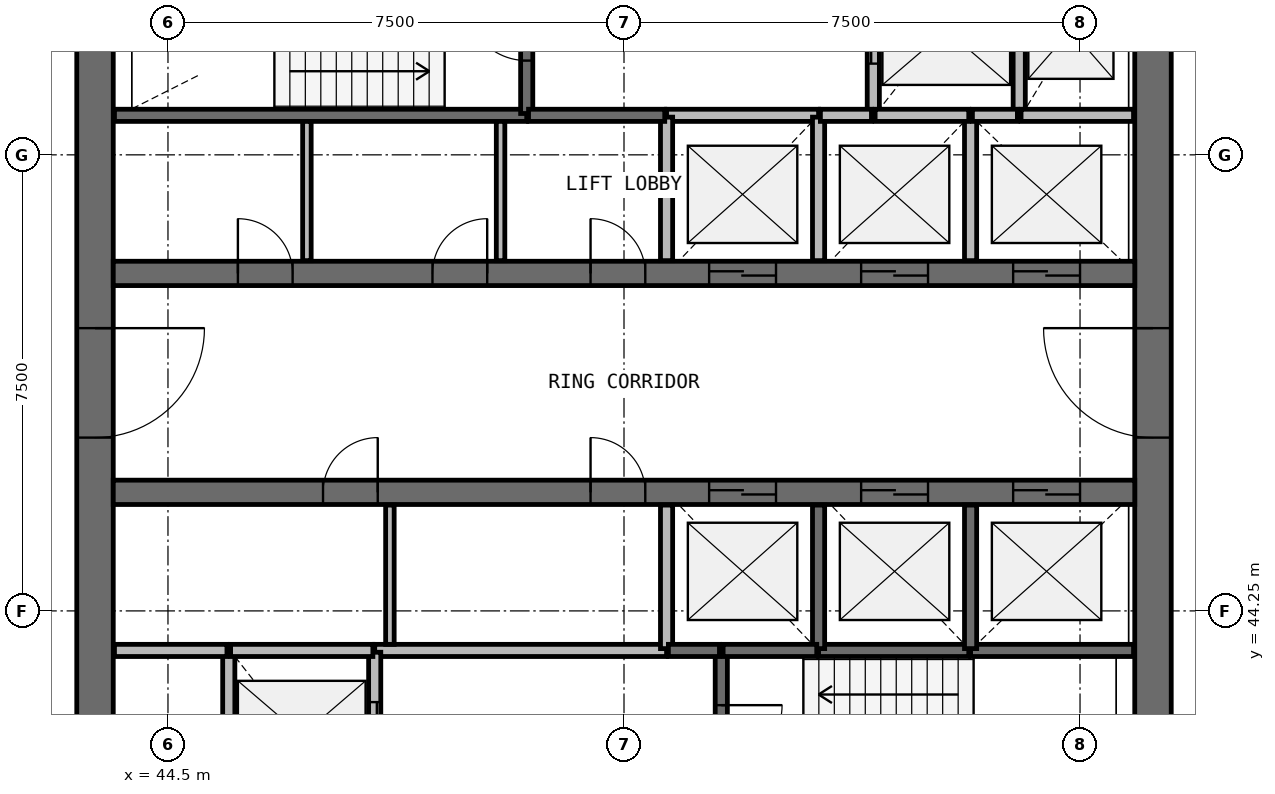
"""IFC4 building model, lengths in metres.
Left out: names, types, materials, properties, quantities, classifications, styles, units other than length and angle.
Written with IfcOpenShell. Run it as: python <this file> out.ifc"""

import sys

from ifc_helpers import new_model, si_unit, direction, frame, frame_2d, origin, place, context, subcontext, project, spatial, rectangle, extrude, source, transform, mapped, element, fill, save


model = new_model("IFC4")
c1 = context("Model", 3, precision=1e-05, world=origin(), true_north=direction((0.0, 1.0)))
c2 = subcontext(c1, "Body", "Model", "MODEL_VIEW")
j1 = project(units=[si_unit("LENGTHUNIT", "METRE"), si_unit("PLANEANGLEUNIT", "RADIAN")], contexts=[c1])
p1 = place(None, origin())
s1 = spatial("IfcSite", under=j1, at=p1, CompositionType="ELEMENT")
p2 = place(p1, origin())
s2 = spatial("IfcBuilding", under=s1, at=p2, CompositionType="ELEMENT")
p3 = place(p2, frame((0.0, 0.0, 195.5)))
s3 = spatial("IfcBuildingStorey", under=s2, at=p3, CompositionType="ELEMENT", Elevation=195.5)
p4 = place(p3, frame((60.7, 40.0, 0.0), z_axis=(0.0, 0.0, 1.0), x_axis=(0.0, 1.0, 0.0)))
e1 = element("IfcWall", 1, at=p4, inside=s3, PredefinedType="SHEAR", context=c2, shape_type="SweptSolid", body=[
    extrude(rectangle(XDim=16.0, YDim=0.6, at=frame_2d((8.0, 0.0))), origin(), (0.0, 0.0, 1.0), 3.9),
])
p5 = place(p4, frame((7.1, 0.0, 0.0)))
e2 = element("IfcOpeningElement", 2, at=p5, cuts=e1, PredefinedType="OPENING", context=c2, shape_type="SweptSolid", body=[
    extrude(rectangle(XDim=1.8, YDim=2.1, at=frame_2d((0.9, 1.05))), frame((0.0, 0.31, 0.0), z_axis=(0.0, -1.0, 0.0), x_axis=(1.0, 0.0, 0.0)), (0.0, 0.0, 1.0), 0.62),
])
p6 = place(p3, frame((43.3, 56.0, 0.0), z_axis=(0.0, 0.0, 1.0), x_axis=(0.0, -1.0, 0.0)))
e3 = element("IfcWall", 3, at=p6, inside=s3, PredefinedType="SHEAR", context=c2, shape_type="SweptSolid", body=[
    extrude(rectangle(XDim=16.0, YDim=0.6, at=frame_2d((8.0, 0.0))), origin(), (0.0, 0.0, 1.0), 3.9),
])
p7 = place(p6, frame((7.1, 0.0, 0.0)))
e4 = element("IfcOpeningElement", 4, at=p7, cuts=e3, PredefinedType="OPENING", context=c2, shape_type="SweptSolid", body=[
    extrude(rectangle(XDim=1.8, YDim=2.1, at=frame_2d((0.9, 1.05))), frame((0.0, 0.31, 0.0), z_axis=(0.0, -1.0, 0.0), x_axis=(1.0, 0.0, 0.0)), (0.0, 0.0, 1.0), 0.62),
])
p8 = place(p3, frame((43.6, 49.8, 0.0), z_axis=(0.0, 0.0, 1.0), x_axis=(1.0, 0.0, 0.0)))
e5 = element("IfcWall", 5, at=p8, inside=s3, PredefinedType="SHEAR", context=c2, shape_type="SweptSolid", body=[
    extrude(rectangle(XDim=16.8, YDim=0.4, at=frame_2d((8.4, 0.0))), origin(), (0.0, 0.0, 1.0), 3.9),
])
p9 = place(p8, frame((9.8, 0.0, 0.0)))
e6 = element("IfcOpeningElement", 6, at=p9, cuts=e5, PredefinedType="OPENING", context=c2, shape_type="SweptSolid", body=[
    extrude(rectangle(XDim=1.1, YDim=2.1, at=frame_2d((0.55, 1.05))), frame((0.0, 0.21, 0.0), z_axis=(0.0, -1.0, 0.0), x_axis=(1.0, 0.0, 0.0)), (0.0, 0.0, 1.0), 0.42),
])
p10 = place(p8, frame((12.3, 0.0, 0.0)))
e7 = element("IfcOpeningElement", 7, at=p10, cuts=e5, PredefinedType="OPENING", context=c2, shape_type="SweptSolid", body=[
    extrude(rectangle(XDim=1.1, YDim=2.1, at=frame_2d((0.55, 1.05))), frame((0.0, 0.21, 0.0), z_axis=(0.0, -1.0, 0.0), x_axis=(1.0, 0.0, 0.0)), (0.0, 0.0, 1.0), 0.42),
])
p11 = place(p8, frame((14.8, 0.0, 0.0)))
e8 = element("IfcOpeningElement", 8, at=p11, cuts=e5, PredefinedType="OPENING", context=c2, shape_type="SweptSolid", body=[
    extrude(rectangle(XDim=1.1, YDim=2.1, at=frame_2d((0.55, 1.05))), frame((0.0, 0.21, 0.0), z_axis=(0.0, -1.0, 0.0), x_axis=(1.0, 0.0, 0.0)), (0.0, 0.0, 1.0), 0.42),
])
p12 = place(p8, frame((2.05, 0.0, 0.0)))
e9 = element("IfcOpeningElement", 9, at=p12, cuts=e5, PredefinedType="OPENING", context=c2, shape_type="SweptSolid", body=[
    extrude(rectangle(XDim=0.9, YDim=2.1, at=frame_2d((0.45, 1.05))), frame((0.0, 0.21, 0.0), z_axis=(0.0, -1.0, 0.0), x_axis=(1.0, 0.0, 0.0)), (0.0, 0.0, 1.0), 0.42),
])
p13 = place(p8, frame((5.25, 0.0, 0.0)))
e10 = element("IfcOpeningElement", 10, at=p13, cuts=e5, PredefinedType="OPENING", context=c2, shape_type="SweptSolid", body=[
    extrude(rectangle(XDim=0.9, YDim=2.1, at=frame_2d((0.45, 1.05))), frame((0.0, 0.21, 0.0), z_axis=(0.0, -1.0, 0.0), x_axis=(1.0, 0.0, 0.0)), (0.0, 0.0, 1.0), 0.42),
])
p14 = place(p8, frame((7.85, 0.0, 0.0)))
e11 = element("IfcOpeningElement", 11, at=p14, cuts=e5, PredefinedType="OPENING", context=c2, shape_type="SweptSolid", body=[
    extrude(rectangle(XDim=0.9, YDim=2.1, at=frame_2d((0.45, 1.05))), frame((0.0, 0.21, 0.0), z_axis=(0.0, -1.0, 0.0), x_axis=(1.0, 0.0, 0.0)), (0.0, 0.0, 1.0), 0.42),
])
p15 = place(p3, frame((43.6, 46.2, 0.0), z_axis=(0.0, 0.0, 1.0), x_axis=(1.0, 0.0, 0.0)))
e12 = element("IfcWall", 12, at=p15, inside=s3, PredefinedType="SHEAR", context=c2, shape_type="SweptSolid", body=[
    extrude(rectangle(XDim=16.8, YDim=0.4, at=frame_2d((8.4, 0.0))), origin(), (0.0, 0.0, 1.0), 3.9),
])
p16 = place(p15, frame((9.8, 0.0, 0.0)))
e13 = element("IfcOpeningElement", 13, at=p16, cuts=e12, PredefinedType="OPENING", context=c2, shape_type="SweptSolid", body=[
    extrude(rectangle(XDim=1.1, YDim=2.1, at=frame_2d((0.55, 1.05))), frame((0.0, 0.21, 0.0), z_axis=(0.0, -1.0, 0.0), x_axis=(1.0, 0.0, 0.0)), (0.0, 0.0, 1.0), 0.42),
])
p17 = place(p15, frame((12.3, 0.0, 0.0)))
e14 = element("IfcOpeningElement", 14, at=p17, cuts=e12, PredefinedType="OPENING", context=c2, shape_type="SweptSolid", body=[
    extrude(rectangle(XDim=1.1, YDim=2.1, at=frame_2d((0.55, 1.05))), frame((0.0, 0.21, 0.0), z_axis=(0.0, -1.0, 0.0), x_axis=(1.0, 0.0, 0.0)), (0.0, 0.0, 1.0), 0.42),
])
p18 = place(p15, frame((14.8, 0.0, 0.0)))
e15 = element("IfcOpeningElement", 15, at=p18, cuts=e12, PredefinedType="OPENING", context=c2, shape_type="SweptSolid", body=[
    extrude(rectangle(XDim=1.1, YDim=2.1, at=frame_2d((0.55, 1.05))), frame((0.0, 0.21, 0.0), z_axis=(0.0, -1.0, 0.0), x_axis=(1.0, 0.0, 0.0)), (0.0, 0.0, 1.0), 0.42),
])
p19 = place(p15, frame((3.45, 0.0, 0.0)))
e16 = element("IfcOpeningElement", 16, at=p19, cuts=e12, PredefinedType="OPENING", context=c2, shape_type="SweptSolid", body=[
    extrude(rectangle(XDim=0.9, YDim=2.1, at=frame_2d((0.45, 1.05))), frame((0.0, 0.21, 0.0), z_axis=(0.0, -1.0, 0.0), x_axis=(1.0, 0.0, 0.0)), (0.0, 0.0, 1.0), 0.42),
])
p20 = place(p15, frame((7.85, 0.0, 0.0)))
e17 = element("IfcOpeningElement", 17, at=p20, cuts=e12, PredefinedType="OPENING", context=c2, shape_type="SweptSolid", body=[
    extrude(rectangle(XDim=0.9, YDim=2.1, at=frame_2d((0.45, 1.05))), frame((0.0, 0.21, 0.0), z_axis=(0.0, -1.0, 0.0), x_axis=(1.0, 0.0, 0.0)), (0.0, 0.0, 1.0), 0.42),
])
p21 = place(p3, frame((43.62, 52.4, 0.0), z_axis=(0.0, 0.0, 1.0), x_axis=(1.0, 0.0, 0.0)))
e18 = element("IfcWall", 18, at=p21, inside=s3, PredefinedType="SOLIDWALL", context=c2, shape_type="SweptSolid", body=[
    extrude(rectangle(XDim=6.78, YDim=0.2, at=frame_2d((3.39, 0.0))), origin(), (0.0, 0.0, 1.0), 3.58),
])
p22 = place(p3, frame((52.7, 43.6, 0.0), z_axis=(0.0, 0.0, 1.0), x_axis=(-1.0, 0.0, 0.0)))
e19 = element("IfcWall", 19, at=p22, inside=s3, PredefinedType="SOLIDWALL", context=c2, shape_type="SweptSolid", body=[
    extrude(rectangle(XDim=4.8, YDim=0.2, at=frame_2d((2.4, 0.0))), origin(), (0.0, 0.0, 1.0), 3.58),
])
p23 = place(p3, frame((45.5, 43.6, 0.0), z_axis=(0.0, 0.0, 1.0), x_axis=(0.0, -1.0, 0.0)))
e20 = element("IfcWall", 20, at=p23, inside=s3, PredefinedType="SOLIDWALL", context=c2, shape_type="SweptSolid", body=[
    extrude(rectangle(XDim=2.98, YDim=0.2, at=frame_2d((1.49, 0.0))), origin(), (0.0, 0.0, 1.0), 3.58),
])
p24 = place(p3, frame((47.9, 40.62, 0.0), z_axis=(0.0, 0.0, 1.0), x_axis=(0.0, 1.0, 0.0)))
e21 = element("IfcWall", 21, at=p24, inside=s3, PredefinedType="SOLIDWALL", context=c2, shape_type="SweptSolid", body=[
    extrude(rectangle(XDim=2.95, YDim=0.2, at=frame_2d((1.475, 0.0))), origin(), (0.0, 0.0, 1.0), 3.58),
])
p25 = place(p24, frame((1.03, 0.0, 0.0)))
e22 = element("IfcOpeningElement", 22, at=p25, cuts=e21, PredefinedType="OPENING", context=c2, shape_type="SweptSolid", body=[
    extrude(rectangle(XDim=1.1, YDim=2.1, at=frame_2d((0.55, 1.05))), frame((0.0, 0.11, 0.0), z_axis=(0.0, -1.0, 0.0), x_axis=(1.0, 0.0, 0.0)), (0.0, 0.0, 1.0), 0.22),
])
p26 = place(p3, frame((50.4, 52.43, 0.0), z_axis=(0.0, 0.0, 1.0), x_axis=(0.0, 1.0, 0.0)))
e23 = element("IfcWall", 23, at=p26, inside=s3, PredefinedType="SOLIDWALL", context=c2, shape_type="SweptSolid", body=[
    extrude(rectangle(XDim=2.95, YDim=0.2, at=frame_2d((1.475, 0.0))), origin(), (0.0, 0.0, 1.0), 3.58),
])
p27 = place(p26, frame((0.87, 0.0, 0.0)))
e24 = element("IfcOpeningElement", 24, at=p27, cuts=e23, PredefinedType="OPENING", context=c2, shape_type="SweptSolid", body=[
    extrude(rectangle(XDim=1.0, YDim=2.1, at=frame_2d((0.5, 1.05))), frame((0.0, 0.11, 0.0), z_axis=(0.0, -1.0, 0.0), x_axis=(1.0, 0.0, 0.0)), (0.0, 0.0, 1.0), 0.22),
])
p28 = place(p3, frame((53.6, 43.6, 0.0), z_axis=(0.0, 0.0, 1.0), x_axis=(0.0, -1.0, 0.0)))
e25 = element("IfcWall", 25, at=p28, inside=s3, PredefinedType="SOLIDWALL", context=c2, shape_type="SweptSolid", body=[
    extrude(rectangle(XDim=2.98, YDim=0.2, at=frame_2d((1.49, 0.0))), origin(), (0.0, 0.0, 1.0), 3.58),
])
p29 = place(p28, frame((0.9, 0.0, 0.0)))
e26 = element("IfcOpeningElement", 26, at=p29, cuts=e25, PredefinedType="OPENING", context=c2, shape_type="SweptSolid", body=[
    extrude(rectangle(XDim=1.0, YDim=2.1, at=frame_2d((0.5, 1.05))), frame((0.0, 0.11, 0.0), z_axis=(0.0, -1.0, 0.0), x_axis=(1.0, 0.0, 0.0)), (0.0, 0.0, 1.0), 0.22),
])
p30 = place(p3, frame((56.1, 55.38, 0.0), z_axis=(0.0, 0.0, 1.0), x_axis=(0.0, -1.0, 0.0)))
e27 = element("IfcWall", 27, at=p30, inside=s3, PredefinedType="SOLIDWALL", context=c2, shape_type="SweptSolid", body=[
    extrude(rectangle(XDim=2.98, YDim=0.2, at=frame_2d((1.49, 0.0))), origin(), (0.0, 0.0, 1.0), 3.58),
])
p31 = place(p30, frame((1.03, 0.0, 0.0)))
e28 = element("IfcOpeningElement", 28, at=p31, cuts=e27, PredefinedType="OPENING", context=c2, shape_type="SweptSolid", body=[
    extrude(rectangle(XDim=1.1, YDim=2.1, at=frame_2d((0.55, 1.05))), frame((0.0, 0.11, 0.0), z_axis=(0.0, -1.0, 0.0), x_axis=(1.0, 0.0, 0.0)), (0.0, 0.0, 1.0), 0.22),
])
p32 = place(p3, frame((58.5, 52.4, 0.0), z_axis=(0.0, 0.0, 1.0), x_axis=(0.0, 1.0, 0.0)))
e29 = element("IfcWall", 29, at=p32, inside=s3, PredefinedType="SOLIDWALL", context=c2, shape_type="SweptSolid", body=[
    extrude(rectangle(XDim=2.98, YDim=0.2, at=frame_2d((1.49, 0.0))), origin(), (0.0, 0.0, 1.0), 3.58),
])
p33 = place(p3, frame((57.7, 43.6, 0.0), z_axis=(0.0, 0.0, 1.0), x_axis=(1.0, 0.0, 0.0)))
e30 = element("IfcWall", 30, at=p33, inside=s3, PredefinedType="SOLIDWALL", context=c2, shape_type="SweptSolid", body=[
    extrude(rectangle(XDim=2.68, YDim=0.2, at=frame_2d((1.34, 0.0))), origin(), (0.0, 0.0, 1.0), 3.58),
])
p34 = place(p3, frame((55.2, 52.4, 0.0), z_axis=(0.0, 0.0, 1.0), x_axis=(-1.0, 0.0, 0.0)))
e31 = element("IfcWall", 31, at=p34, inside=s3, PredefinedType="SOLIDWALL", context=c2, shape_type="SweptSolid", body=[
    extrude(rectangle(XDim=2.5, YDim=0.2, at=frame_2d((1.25, 0.0))), origin(), (0.0, 0.0, 1.0), 3.58),
])
p35 = place(p3, frame((55.2, 43.6, 0.0), z_axis=(0.0, 0.0, 1.0), x_axis=(1.0, 0.0, 0.0)))
e32 = element("IfcWall", 32, at=p35, inside=s3, PredefinedType="SOLIDWALL", context=c2, shape_type="SweptSolid", body=[
    extrude(rectangle(XDim=2.47, YDim=0.2, at=frame_2d((1.235, 0.0))), origin(), (0.0, 0.0, 1.0), 3.58),
])
p36 = place(p3, frame((47.87, 43.6, 0.0), z_axis=(0.0, 0.0, 1.0), x_axis=(-1.0, 0.0, 0.0)))
e33 = element("IfcWall", 33, at=p36, inside=s3, PredefinedType="SOLIDWALL", context=c2, shape_type="SweptSolid", body=[
    extrude(rectangle(XDim=2.34, YDim=0.2, at=frame_2d((1.17, 0.0))), origin(), (0.0, 0.0, 1.0), 3.58),
])
for number, where, z_axis, x_axis in (
    (34, (52.7, 45.99, 0.0), (0.0, 0.0, 1.0), (0.0, -1.0, 0.0)),
    (35, (52.7, 52.37, 0.0), (0.0, 0.0, 1.0), (0.0, -1.0, 0.0)),
    (36, (55.2, 43.63, 0.0), (0.0, 0.0, 1.0), (0.0, 1.0, 0.0)),
    (37, (55.2, 50.01, 0.0), (0.0, 0.0, 1.0), (0.0, 1.0, 0.0)),
    (38, (57.7, 43.63, 0.0), (0.0, 0.0, 1.0), (0.0, 1.0, 0.0)),
):
    element("IfcWall", number, at=place(p3, frame(where, z_axis=z_axis, x_axis=x_axis)), inside=s3, PredefinedType="SOLIDWALL", context=c2, shape_type="SweptSolid", body=[
        extrude(rectangle(XDim=2.36, YDim=0.2, at=frame_2d((1.18, 0.0))), origin(), (0.0, 0.0, 1.0), 3.58),
    ])
p37 = place(p3, frame((57.7, 50.01, 0.0), z_axis=(0.0, 0.0, 1.0), x_axis=(0.0, 1.0, 0.0)))
e39 = element("IfcWall", 39, at=p37, inside=s3, PredefinedType="SOLIDWALL", context=c2, shape_type="SweptSolid", body=[
    extrude(rectangle(XDim=2.39, YDim=0.2, at=frame_2d((1.195, 0.0))), origin(), (0.0, 0.0, 1.0), 3.58),
])
p38 = place(p3, frame((50.43, 52.4, 0.0), z_axis=(0.0, 0.0, 1.0), x_axis=(1.0, 0.0, 0.0)))
e40 = element("IfcWall", 40, at=p38, inside=s3, PredefinedType="SOLIDWALL", context=c2, shape_type="SweptSolid", body=[
    extrude(rectangle(XDim=2.24, YDim=0.2, at=frame_2d((1.12, 0.0))), origin(), (0.0, 0.0, 1.0), 3.58),
])
for number, where, z_axis, x_axis in (
    (41, (45.47, 43.6, 0.0), (0.0, 0.0, 1.0), (-1.0, 0.0, 0.0)),
    (42, (60.38, 52.4, 0.0), (0.0, 0.0, 1.0), (-1.0, 0.0, 0.0)),
):
    element("IfcWall", number, at=place(p3, frame(where, z_axis=z_axis, x_axis=x_axis)), inside=s3, PredefinedType="SOLIDWALL", context=c2, shape_type="SweptSolid", body=[
        extrude(rectangle(XDim=1.85, YDim=0.2, at=frame_2d((0.925, 0.0))), origin(), (0.0, 0.0, 1.0), 3.58),
    ])
for number, where, z_axis, x_axis in (
    (43, (53.63, 43.6, 0.0), (0.0, 0.0, 1.0), (1.0, 0.0, 0.0)),
    (44, (57.67, 52.4, 0.0), (0.0, 0.0, 1.0), (-1.0, 0.0, 0.0)),
):
    element("IfcWall", number, at=place(p3, frame(where, z_axis=z_axis, x_axis=x_axis)), inside=s3, PredefinedType="SOLIDWALL", context=c2, shape_type="SweptSolid", body=[
        extrude(rectangle(XDim=1.54, YDim=0.2, at=frame_2d((0.77, 0.0))), origin(), (0.0, 0.0, 1.0), 3.58),
    ])
for number, where, z_axis, x_axis in (
    (45, (52.73, 43.6, 0.0), (0.0, 0.0, 1.0), (1.0, 0.0, 0.0)),
    (46, (56.07, 52.4, 0.0), (0.0, 0.0, 1.0), (-1.0, 0.0, 0.0)),
):
    element("IfcWall", number, at=place(p3, frame(where, z_axis=z_axis, x_axis=x_axis)), inside=s3, PredefinedType="SOLIDWALL", context=c2, shape_type="SweptSolid", body=[
        extrude(rectangle(XDim=0.84, YDim=0.2, at=frame_2d((0.42, 0.0))), origin(), (0.0, 0.0, 1.0), 3.58),
    ])
p39 = place(p3, frame((58.47, 52.4, 0.0), z_axis=(0.0, 0.0, 1.0), x_axis=(-1.0, 0.0, 0.0)))
e47 = element("IfcWall", 47, at=p39, inside=s3, PredefinedType="SOLIDWALL", context=c2, shape_type="SweptSolid", body=[
    extrude(rectangle(XDim=0.74, YDim=0.2, at=frame_2d((0.37, 0.0))), origin(), (0.0, 0.0, 1.0), 3.58),
])
for number, where, z_axis, x_axis in (
    (48, (46.785, 50.01, 0.0), (0.0, 0.0, 1.0), (0.0, 1.0, 0.0)),
    (49, (48.15, 43.7, 0.0), (0.0, 0.0, 1.0), (0.0, 1.0, 0.0)),
    (50, (49.97, 50.01, 0.0), (0.0, 0.0, 1.0), (0.0, 1.0, 0.0)),
):
    element("IfcWall", number, at=place(p3, frame(where, z_axis=z_axis, x_axis=x_axis)), inside=s3, PredefinedType="PARTITIONING", context=c2, shape_type="SweptSolid", body=[
        extrude(rectangle(XDim=2.29, YDim=0.14, at=frame_2d((1.145, 0.0))), origin(), (0.0, 0.0, 1.0), 2.88),
    ])
m1 = source(origin(), c2, "Body", "SweptSolid", [
    extrude(rectangle(XDim=1.8, YDim=2.1, at=frame_2d((0.9, 1.05))), frame((0.0, 0.025, 0.0), z_axis=(0.0, -1.0, 0.0), x_axis=(1.0, 0.0, 0.0)), (0.0, 0.0, 1.0), 0.05),
])
p40 = place(p7, origin())
e51 = element("IfcDoor", 51, at=p40, inside=s3, OperationType="SINGLE_SWING_LEFT", PredefinedType="DOOR", context=c2, shape_type="MappedRepresentation", body=[
    mapped(m1, transform((0.0, 0.0, 0.0), scale=1.0)),
])
fill(e4, e51)
p41 = place(p5, origin())
e52 = element("IfcDoor", 52, at=p41, inside=s3, OperationType="SINGLE_SWING_RIGHT", PredefinedType="DOOR", context=c2, shape_type="MappedRepresentation", body=[
    mapped(m1, transform((0.0, 0.0, 0.0), scale=1.0)),
])
fill(e2, e52)
m2 = source(origin(), c2, "Body", "SweptSolid", [
    extrude(rectangle(XDim=1.1, YDim=2.1, at=frame_2d((0.55, 1.05))), frame((0.0, 0.025, 0.0), z_axis=(0.0, -1.0, 0.0), x_axis=(1.0, 0.0, 0.0)), (0.0, 0.0, 1.0), 0.05),
])
p42 = place(p9, origin())
e53 = element("IfcDoor", 53, at=p42, inside=s3, OperationType="DOUBLE_DOOR_SLIDING", PredefinedType="USERDEFINED", context=c2, shape_type="MappedRepresentation", body=[
    mapped(m2, transform((0.0, 0.0, 0.0), scale=1.0)),
])
fill(e6, e53)
p43 = place(p10, origin())
e54 = element("IfcDoor", 54, at=p43, inside=s3, OperationType="DOUBLE_DOOR_SLIDING", PredefinedType="USERDEFINED", context=c2, shape_type="MappedRepresentation", body=[
    mapped(m2, transform((0.0, 0.0, 0.0), scale=1.0)),
])
fill(e7, e54)
p44 = place(p11, origin())
e55 = element("IfcDoor", 55, at=p44, inside=s3, OperationType="DOUBLE_DOOR_SLIDING", PredefinedType="USERDEFINED", context=c2, shape_type="MappedRepresentation", body=[
    mapped(m2, transform((0.0, 0.0, 0.0), scale=1.0)),
])
fill(e8, e55)
p45 = place(p16, origin())
e56 = element("IfcDoor", 56, at=p45, inside=s3, OperationType="DOUBLE_DOOR_SLIDING", PredefinedType="USERDEFINED", context=c2, shape_type="MappedRepresentation", body=[
    mapped(m2, transform((0.0, 0.0, 0.0), scale=1.0)),
])
fill(e13, e56)
p46 = place(p17, origin())
e57 = element("IfcDoor", 57, at=p46, inside=s3, OperationType="DOUBLE_DOOR_SLIDING", PredefinedType="USERDEFINED", context=c2, shape_type="MappedRepresentation", body=[
    mapped(m2, transform((0.0, 0.0, 0.0), scale=1.0)),
])
fill(e14, e57)
p47 = place(p18, origin())
e58 = element("IfcDoor", 58, at=p47, inside=s3, OperationType="DOUBLE_DOOR_SLIDING", PredefinedType="USERDEFINED", context=c2, shape_type="MappedRepresentation", body=[
    mapped(m2, transform((0.0, 0.0, 0.0), scale=1.0)),
])
fill(e15, e58)
p48 = place(p31, origin())
e59 = element("IfcDoor", 59, at=p48, inside=s3, OperationType="DOUBLE_DOOR_SLIDING", PredefinedType="USERDEFINED", context=c2, shape_type="MappedRepresentation", body=[
    mapped(m2, transform((0.0, 0.0, 0.0), scale=1.0)),
])
fill(e28, e59)
p49 = place(p25, origin())
e60 = element("IfcDoor", 60, at=p49, inside=s3, OperationType="DOUBLE_DOOR_SLIDING", PredefinedType="USERDEFINED", context=c2, shape_type="MappedRepresentation", body=[
    mapped(m2, transform((0.0, 0.0, 0.0), scale=1.0)),
])
fill(e22, e60)
m3 = source(origin(), c2, "Body", "SweptSolid", [
    extrude(rectangle(XDim=1.0, YDim=2.1, at=frame_2d((0.5, 1.05))), frame((0.0, 0.025, 0.0), z_axis=(0.0, -1.0, 0.0), x_axis=(1.0, 0.0, 0.0)), (0.0, 0.0, 1.0), 0.05),
])
p50 = place(p27, origin())
e61 = element("IfcDoor", 61, at=p50, inside=s3, OperationType="SINGLE_SWING_RIGHT", PredefinedType="DOOR", context=c2, shape_type="MappedRepresentation", body=[
    mapped(m3, transform((0.0, 0.0, 0.0), scale=1.0)),
])
fill(e24, e61)
p51 = place(p29, origin())
e62 = element("IfcDoor", 62, at=p51, inside=s3, OperationType="SINGLE_SWING_LEFT", PredefinedType="DOOR", context=c2, shape_type="MappedRepresentation", body=[
    mapped(m3, transform((0.0, 0.0, 0.0), scale=1.0)),
])
fill(e26, e62)
m4 = source(origin(), c2, "Body", "SweptSolid", [
    extrude(rectangle(XDim=0.9, YDim=2.1, at=frame_2d((0.45, 1.05))), frame((0.0, 0.025, 0.0), z_axis=(0.0, -1.0, 0.0), x_axis=(1.0, 0.0, 0.0)), (0.0, 0.0, 1.0), 0.05),
])
p52 = place(p12, origin())
e63 = element("IfcDoor", 63, at=p52, inside=s3, OperationType="SINGLE_SWING_LEFT", PredefinedType="DOOR", context=c2, shape_type="MappedRepresentation", body=[
    mapped(m4, transform((0.0, 0.0, 0.0), scale=1.0)),
])
fill(e9, e63)
p53 = place(p13, origin())
e64 = element("IfcDoor", 64, at=p53, inside=s3, OperationType="SINGLE_SWING_RIGHT", PredefinedType="DOOR", context=c2, shape_type="MappedRepresentation", body=[
    mapped(m4, transform((0.0, 0.0, 0.0), scale=1.0)),
])
fill(e10, e64)
p54 = place(p14, origin())
e65 = element("IfcDoor", 65, at=p54, inside=s3, OperationType="SINGLE_SWING_LEFT", PredefinedType="DOOR", context=c2, shape_type="MappedRepresentation", body=[
    mapped(m4, transform((0.0, 0.0, 0.0), scale=1.0)),
])
fill(e11, e65)
p55 = place(p19, origin())
e66 = element("IfcDoor", 66, at=p55, inside=s3, OperationType="SINGLE_SWING_RIGHT", PredefinedType="DOOR", context=c2, shape_type="MappedRepresentation", body=[
    mapped(m4, transform((0.0, 0.0, 0.0), scale=1.0)),
])
fill(e16, e66)
p56 = place(p20, origin())
e67 = element("IfcDoor", 67, at=p56, inside=s3, OperationType="SINGLE_SWING_LEFT", PredefinedType="DOOR", context=c2, shape_type="MappedRepresentation", body=[
    mapped(m4, transform((0.0, 0.0, 0.0), scale=1.0)),
])
fill(e17, e67)
save(model, sys.argv[1])
